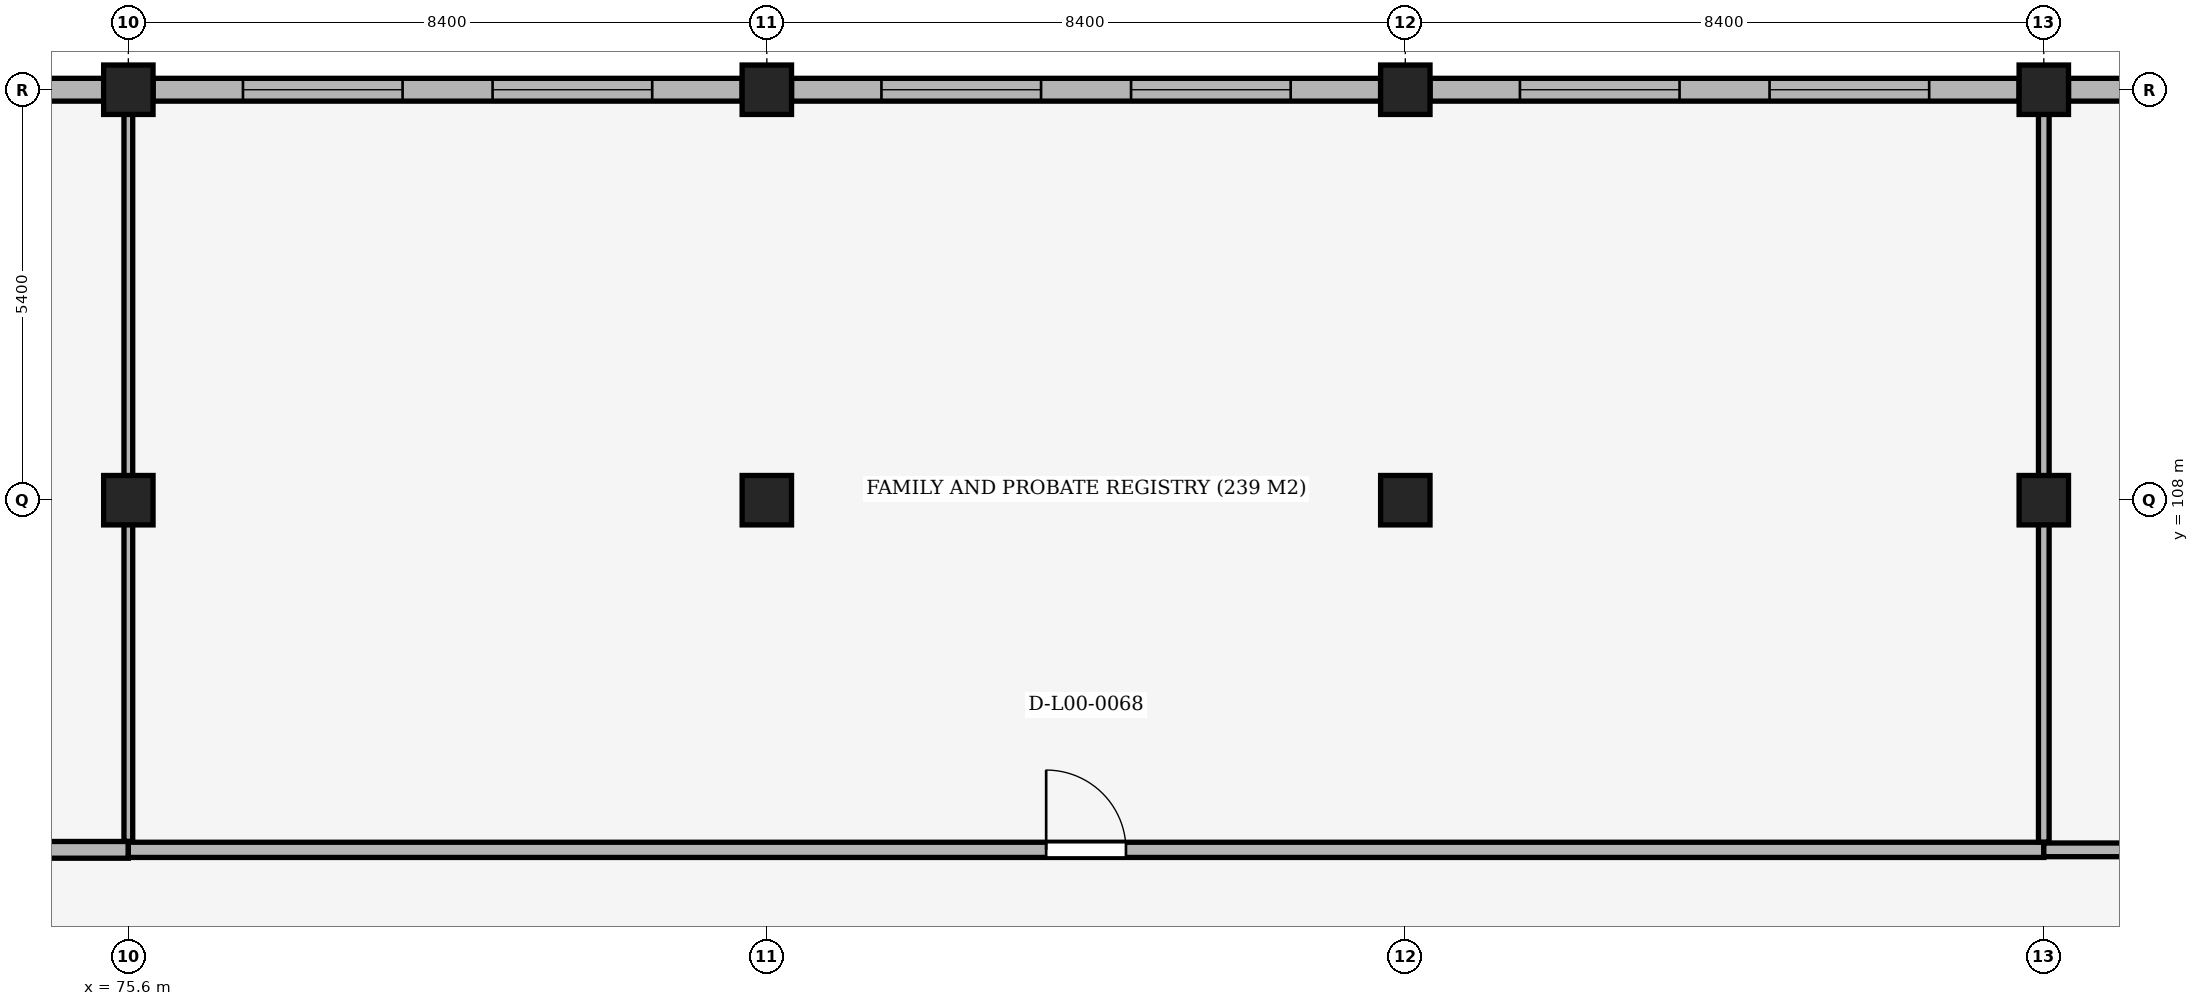
"""IFC4 building model, lengths in metres.
Left out: names, types, materials, properties, quantities, classifications, styles, units other than length and angle.
Written with IfcOpenShell. Run it as: python <this file> out.ifc"""

import sys

from ifc_helpers import new_model, si_unit, direction, frame, frame_2d, origin, origin_2d, place, context, subcontext, project, spatial, rectangle, extrude, element, fill, save


model = new_model("IFC4")
c1 = context("Model", 3, precision=1e-05, world=origin(), true_north=direction((0.0, 1.0)))
c2 = subcontext(c1, "Body", "Model", "MODEL_VIEW")
j1 = project(units=[si_unit("LENGTHUNIT", "METRE"), si_unit("PLANEANGLEUNIT", "RADIAN")], contexts=[c1])
p1 = place(None, origin())
s1 = spatial("IfcSite", under=j1, at=p1, CompositionType="ELEMENT")
p2 = place(p1, origin())
s2 = spatial("IfcBuilding", under=s1, at=p2, CompositionType="ELEMENT")
p3 = place(p2, origin())
s3 = spatial("IfcBuildingStorey", under=s2, at=p3, CompositionType="ELEMENT", Elevation=0.0)
for number, where, z_axis, x_axis in (
    (1, (75.6, 108.0, 0.0), (0.0, 0.0, 1.0), (1.0, 0.0, 0.0)),
    (2, (75.6, 113.4, 0.0), (0.0, 0.0, 1.0), (1.0, 0.0, 0.0)),
    (3, (84.0, 108.0, 0.0), (0.0, 0.0, 1.0), (1.0, 0.0, 0.0)),
    (4, (84.0, 113.4, 0.0), (0.0, 0.0, 1.0), (1.0, 0.0, 0.0)),
    (5, (92.4, 108.0, 0.0), (0.0, 0.0, 1.0), (1.0, 0.0, 0.0)),
    (6, (92.4, 113.4, 0.0), (0.0, 0.0, 1.0), (1.0, 0.0, 0.0)),
    (7, (100.8, 108.0, 0.0), (0.0, 0.0, 1.0), (1.0, 0.0, 0.0)),
    (8, (100.8, 113.4, 0.0), (0.0, 0.0, 1.0), (1.0, 0.0, 0.0)),
):
    element("IfcColumn", number, at=place(p3, frame(where, z_axis=z_axis, x_axis=x_axis)), inside=s3, PredefinedType="COLUMN", context=c2, shape_type="SweptSolid", body=[
        extrude(rectangle(XDim=0.65, YDim=0.65, at=origin_2d()), origin(), (0.0, 0.0, 1.0), 5.1),
    ])
p4 = place(p3, frame((67.525, 113.4, 0.0), z_axis=(0.0, 0.0, 1.0), x_axis=(1.0, 0.0, 0.0)))
e9 = element("IfcWall", 9, at=p4, inside=s3, PredefinedType="SOLIDWALL", context=c2, shape_type="SweptSolid", body=[
    extrude(rectangle(XDim=7.75, YDim=0.3, at=frame_2d((3.875, 0.0))), origin(), (0.0, 0.0, 1.0), 4.12),
])
p5 = place(p4, frame((1.183, 0.0, 0.9)))
e10 = element("IfcOpeningElement", 10, at=p5, cuts=e9, PredefinedType="OPENING", context=c2, shape_type="SweptSolid", body=[
    extrude(rectangle(XDim=2.1, YDim=2.1, at=frame_2d((1.05, 1.05))), frame((0.0, 0.165, 0.0), z_axis=(0.0, -1.0, 0.0), x_axis=(1.0, 0.0, 0.0)), (0.0, 0.0, 1.0), 0.33),
])
p6 = place(p4, frame((4.467, 0.0, 0.9)))
e11 = element("IfcOpeningElement", 11, at=p6, cuts=e9, PredefinedType="OPENING", context=c2, shape_type="SweptSolid", body=[
    extrude(rectangle(XDim=2.1, YDim=2.1, at=frame_2d((1.05, 1.05))), frame((0.0, 0.165, 0.0), z_axis=(0.0, -1.0, 0.0), x_axis=(1.0, 0.0, 0.0)), (0.0, 0.0, 1.0), 0.33),
])
p7 = place(p3, frame((75.925, 113.4, 0.0), z_axis=(0.0, 0.0, 1.0), x_axis=(1.0, 0.0, 0.0)))
e12 = element("IfcWall", 12, at=p7, inside=s3, PredefinedType="SOLIDWALL", context=c2, shape_type="SweptSolid", body=[
    extrude(rectangle(XDim=7.75, YDim=0.3, at=frame_2d((3.875, 0.0))), origin(), (0.0, 0.0, 1.0), 4.12),
])
p8 = place(p7, frame((1.183, 0.0, 0.9)))
e13 = element("IfcOpeningElement", 13, at=p8, cuts=e12, PredefinedType="OPENING", context=c2, shape_type="SweptSolid", body=[
    extrude(rectangle(XDim=2.1, YDim=2.1, at=frame_2d((1.05, 1.05))), frame((0.0, 0.165, 0.0), z_axis=(0.0, -1.0, 0.0), x_axis=(1.0, 0.0, 0.0)), (0.0, 0.0, 1.0), 0.33),
])
p9 = place(p7, frame((4.467, 0.0, 0.9)))
e14 = element("IfcOpeningElement", 14, at=p9, cuts=e12, PredefinedType="OPENING", context=c2, shape_type="SweptSolid", body=[
    extrude(rectangle(XDim=2.1, YDim=2.1, at=frame_2d((1.05, 1.05))), frame((0.0, 0.165, 0.0), z_axis=(0.0, -1.0, 0.0), x_axis=(1.0, 0.0, 0.0)), (0.0, 0.0, 1.0), 0.33),
])
p10 = place(p3, frame((84.325, 113.4, 0.0), z_axis=(0.0, 0.0, 1.0), x_axis=(1.0, 0.0, 0.0)))
e15 = element("IfcWall", 15, at=p10, inside=s3, PredefinedType="SOLIDWALL", context=c2, shape_type="SweptSolid", body=[
    extrude(rectangle(XDim=7.75, YDim=0.3, at=frame_2d((3.875, 0.0))), origin(), (0.0, 0.0, 1.0), 4.12),
])
p11 = place(p10, frame((1.183, 0.0, 0.9)))
e16 = element("IfcOpeningElement", 16, at=p11, cuts=e15, PredefinedType="OPENING", context=c2, shape_type="SweptSolid", body=[
    extrude(rectangle(XDim=2.1, YDim=2.1, at=frame_2d((1.05, 1.05))), frame((0.0, 0.165, 0.0), z_axis=(0.0, -1.0, 0.0), x_axis=(1.0, 0.0, 0.0)), (0.0, 0.0, 1.0), 0.33),
])
p12 = place(p10, frame((4.467, 0.0, 0.9)))
e17 = element("IfcOpeningElement", 17, at=p12, cuts=e15, PredefinedType="OPENING", context=c2, shape_type="SweptSolid", body=[
    extrude(rectangle(XDim=2.1, YDim=2.1, at=frame_2d((1.05, 1.05))), frame((0.0, 0.165, 0.0), z_axis=(0.0, -1.0, 0.0), x_axis=(1.0, 0.0, 0.0)), (0.0, 0.0, 1.0), 0.33),
])
p13 = place(p3, frame((92.725, 113.4, 0.0), z_axis=(0.0, 0.0, 1.0), x_axis=(1.0, 0.0, 0.0)))
e18 = element("IfcWall", 18, at=p13, inside=s3, PredefinedType="SOLIDWALL", context=c2, shape_type="SweptSolid", body=[
    extrude(rectangle(XDim=7.75, YDim=0.3, at=frame_2d((3.875, 0.0))), origin(), (0.0, 0.0, 1.0), 4.12),
])
p14 = place(p13, frame((1.183, 0.0, 0.9)))
e19 = element("IfcOpeningElement", 19, at=p14, cuts=e18, PredefinedType="OPENING", context=c2, shape_type="SweptSolid", body=[
    extrude(rectangle(XDim=2.1, YDim=2.1, at=frame_2d((1.05, 1.05))), frame((0.0, 0.165, 0.0), z_axis=(0.0, -1.0, 0.0), x_axis=(1.0, 0.0, 0.0)), (0.0, 0.0, 1.0), 0.33),
])
p15 = place(p13, frame((4.467, 0.0, 0.9)))
e20 = element("IfcOpeningElement", 20, at=p15, cuts=e18, PredefinedType="OPENING", context=c2, shape_type="SweptSolid", body=[
    extrude(rectangle(XDim=2.1, YDim=2.1, at=frame_2d((1.05, 1.05))), frame((0.0, 0.165, 0.0), z_axis=(0.0, -1.0, 0.0), x_axis=(1.0, 0.0, 0.0)), (0.0, 0.0, 1.0), 0.33),
])
p16 = place(p3, frame((101.125, 113.4, 0.0), z_axis=(0.0, 0.0, 1.0), x_axis=(1.0, 0.0, 0.0)))
e21 = element("IfcWall", 21, at=p16, inside=s3, PredefinedType="SOLIDWALL", context=c2, shape_type="SweptSolid", body=[
    extrude(rectangle(XDim=7.75, YDim=0.3, at=frame_2d((3.875, 0.0))), origin(), (0.0, 0.0, 1.0), 4.12),
])
p17 = place(p16, frame((1.183, 0.0, 0.9)))
e22 = element("IfcOpeningElement", 22, at=p17, cuts=e21, PredefinedType="OPENING", context=c2, shape_type="SweptSolid", body=[
    extrude(rectangle(XDim=2.1, YDim=2.1, at=frame_2d((1.05, 1.05))), frame((0.0, 0.165, 0.0), z_axis=(0.0, -1.0, 0.0), x_axis=(1.0, 0.0, 0.0)), (0.0, 0.0, 1.0), 0.33),
])
p18 = place(p16, frame((4.467, 0.0, 0.9)))
e23 = element("IfcOpeningElement", 23, at=p18, cuts=e21, PredefinedType="OPENING", context=c2, shape_type="SweptSolid", body=[
    extrude(rectangle(XDim=2.1, YDim=2.1, at=frame_2d((1.05, 1.05))), frame((0.0, 0.165, 0.0), z_axis=(0.0, -1.0, 0.0), x_axis=(1.0, 0.0, 0.0)), (0.0, 0.0, 1.0), 0.33),
])
p19 = place(p3, frame((42.0, 103.4, 0.0), z_axis=(0.0, 0.0, 1.0), x_axis=(1.0, 0.0, 0.0)))
e24 = element("IfcWall", 24, at=p19, inside=s3, PredefinedType="PARTITIONING", context=c2, shape_type="SweptSolid", body=[
    extrude(rectangle(XDim=33.6, YDim=0.22, at=frame_2d((16.8, 0.0))), origin(), (0.0, 0.0, 1.0), 4.02),
])
p20 = place(p19, frame((16.35, 0.0, 0.0)))
e25 = element("IfcOpeningElement", 25, at=p20, cuts=e24, PredefinedType="OPENING", context=c2, shape_type="SweptSolid", body=[
    extrude(rectangle(XDim=0.9, YDim=2.1, at=frame_2d((0.45, 1.05))), frame((0.0, 0.125, 0.0), z_axis=(0.0, -1.0, 0.0), x_axis=(1.0, 0.0, 0.0)), (0.0, 0.0, 1.0), 0.25),
])
p21 = place(p3, frame((75.6, 103.4, 0.0), z_axis=(0.0, 0.0, 1.0), x_axis=(1.0, 0.0, 0.0)))
e26 = element("IfcWall", 26, at=p21, inside=s3, PredefinedType="PARTITIONING", context=c2, shape_type="SweptSolid", body=[
    extrude(rectangle(XDim=25.2, YDim=0.2, at=frame_2d((12.6, 0.0))), origin(), (0.0, 0.0, 1.0), 4.02),
])
p22 = place(p21, frame((12.075, 0.0, 0.0)))
e27 = element("IfcOpeningElement", 27, at=p22, cuts=e26, PredefinedType="OPENING", context=c2, shape_type="SweptSolid", body=[
    extrude(rectangle(XDim=1.05, YDim=2.1, at=frame_2d((0.525, 1.05))), frame((0.0, 0.115, 0.0), z_axis=(0.0, -1.0, 0.0), x_axis=(1.0, 0.0, 0.0)), (0.0, 0.0, 1.0), 0.23),
])
p23 = place(p3, frame((100.8, 103.4, 0.0), z_axis=(0.0, 0.0, 1.0), x_axis=(1.0, 0.0, 0.0)))
e28 = element("IfcWall", 28, at=p23, inside=s3, PredefinedType="PARTITIONING", context=c2, shape_type="SweptSolid", body=[
    extrude(rectangle(XDim=24.8, YDim=0.18, at=frame_2d((12.4, 0.0))), origin(), (0.0, 0.0, 1.0), 4.02),
])
p24 = place(p23, frame((11.775, 0.0, 0.0)))
e29 = element("IfcOpeningElement", 29, at=p24, cuts=e28, PredefinedType="OPENING", context=c2, shape_type="SweptSolid", body=[
    extrude(rectangle(XDim=1.25, YDim=2.2, at=frame_2d((0.625, 1.1))), frame((0.0, 0.105, 0.0), z_axis=(0.0, -1.0, 0.0), x_axis=(1.0, 0.0, 0.0)), (0.0, 0.0, 1.0), 0.21),
])
p25 = place(p3, frame((75.6, 103.512, 0.0), z_axis=(0.0, 0.0, 1.0), x_axis=(0.0, 1.0, 0.0)))
e30 = element("IfcWall", 30, at=p25, inside=s3, PredefinedType="PARTITIONING", context=c2, shape_type="SweptSolid", body=[
    extrude(rectangle(XDim=9.839, YDim=0.115, at=frame_2d((4.919, 0.0))), origin(), (0.0, 0.0, 1.0), 4.02),
])
p26 = place(p3, frame((100.8, 103.502, 0.0), z_axis=(0.0, 0.0, 1.0), x_axis=(0.0, 1.0, 0.0)))
e31 = element("IfcWall", 31, at=p26, inside=s3, PredefinedType="PARTITIONING", context=c2, shape_type="SweptSolid", body=[
    extrude(rectangle(XDim=9.849, YDim=0.14, at=frame_2d((4.925, 0.0))), origin(), (0.0, 0.0, 1.0), 4.02),
])
p27 = place(p8, origin())
e32 = element("IfcWindow", 32, at=p27, inside=s3, PartitioningType="SINGLE_PANEL", PredefinedType="WINDOW", context=c2, shape_type="SweptSolid", body=[
    extrude(rectangle(XDim=2.1, YDim=2.1, at=frame_2d((1.05, 1.05))), frame((0.0, 0.03, 0.0), z_axis=(0.0, -1.0, 0.0), x_axis=(1.0, 0.0, 0.0)), (0.0, 0.0, 1.0), 0.06),
])
fill(e13, e32)
p28 = place(p9, origin())
e33 = element("IfcWindow", 33, at=p28, inside=s3, PartitioningType="SINGLE_PANEL", PredefinedType="WINDOW", context=c2, shape_type="SweptSolid", body=[
    extrude(rectangle(XDim=2.1, YDim=2.1, at=frame_2d((1.05, 1.05))), frame((0.0, 0.03, 0.0), z_axis=(0.0, -1.0, 0.0), x_axis=(1.0, 0.0, 0.0)), (0.0, 0.0, 1.0), 0.06),
])
fill(e14, e33)
p29 = place(p11, origin())
e34 = element("IfcWindow", 34, at=p29, inside=s3, PartitioningType="SINGLE_PANEL", PredefinedType="WINDOW", context=c2, shape_type="SweptSolid", body=[
    extrude(rectangle(XDim=2.1, YDim=2.1, at=frame_2d((1.05, 1.05))), frame((0.0, 0.03, 0.0), z_axis=(0.0, -1.0, 0.0), x_axis=(1.0, 0.0, 0.0)), (0.0, 0.0, 1.0), 0.06),
])
fill(e16, e34)
p30 = place(p12, origin())
e35 = element("IfcWindow", 35, at=p30, inside=s3, PartitioningType="SINGLE_PANEL", PredefinedType="WINDOW", context=c2, shape_type="SweptSolid", body=[
    extrude(rectangle(XDim=2.1, YDim=2.1, at=frame_2d((1.05, 1.05))), frame((0.0, 0.03, 0.0), z_axis=(0.0, -1.0, 0.0), x_axis=(1.0, 0.0, 0.0)), (0.0, 0.0, 1.0), 0.06),
])
fill(e17, e35)
p31 = place(p14, origin())
e36 = element("IfcWindow", 36, at=p31, inside=s3, PartitioningType="SINGLE_PANEL", PredefinedType="WINDOW", context=c2, shape_type="SweptSolid", body=[
    extrude(rectangle(XDim=2.1, YDim=2.1, at=frame_2d((1.05, 1.05))), frame((0.0, 0.03, 0.0), z_axis=(0.0, -1.0, 0.0), x_axis=(1.0, 0.0, 0.0)), (0.0, 0.0, 1.0), 0.06),
])
fill(e19, e36)
p32 = place(p15, origin())
e37 = element("IfcWindow", 37, at=p32, inside=s3, PartitioningType="SINGLE_PANEL", PredefinedType="WINDOW", context=c2, shape_type="SweptSolid", body=[
    extrude(rectangle(XDim=2.1, YDim=2.1, at=frame_2d((1.05, 1.05))), frame((0.0, 0.03, 0.0), z_axis=(0.0, -1.0, 0.0), x_axis=(1.0, 0.0, 0.0)), (0.0, 0.0, 1.0), 0.06),
])
fill(e20, e37)
p33 = place(p22, origin())
e38 = element("IfcDoor", 38, at=p33, inside=s3, OperationType="SINGLE_SWING_LEFT", PredefinedType="DOOR", context=c2, shape_type="SweptSolid", body=[
    extrude(rectangle(XDim=1.05, YDim=2.1, at=frame_2d((0.525, 1.05))), frame((0.0, 0.025, 0.0), z_axis=(0.0, -1.0, 0.0), x_axis=(1.0, 0.0, 0.0)), (0.0, 0.0, 1.0), 0.05),
])
fill(e27, e38)
save(model, sys.argv[1])
